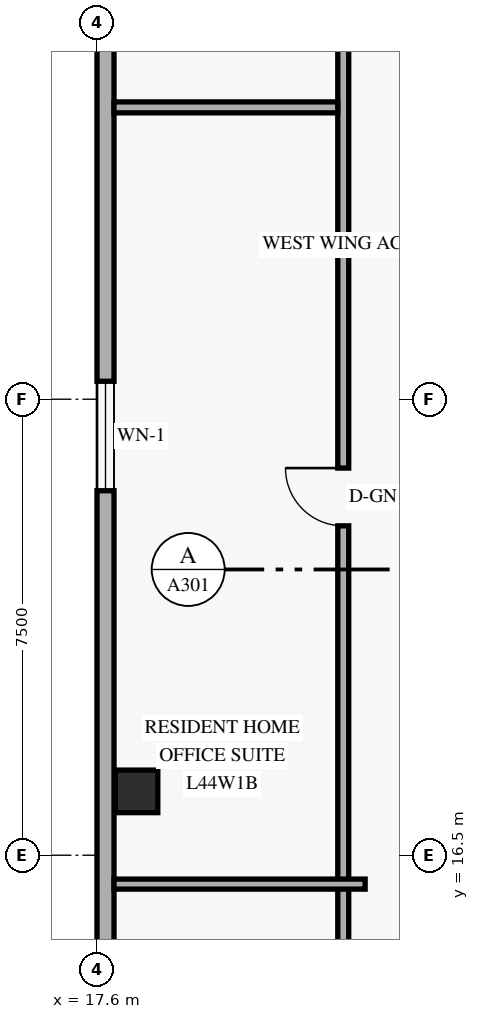
"""IFC4 building model, lengths in metres.
Left out: names, types, materials, properties, quantities, classifications, styles, units other than length and angle.
Written with IfcOpenShell. Run it as: python <this file> out.ifc"""

import sys

from ifc_helpers import new_model, si_unit, direction, frame, frame_2d, origin, origin_2d, place, context, subcontext, project, spatial, rectangle, extrude, element, fill, save


model = new_model("IFC4")
c1 = context("Model", 3, precision=1e-05, world=origin(), true_north=direction((0.0, 1.0)))
c2 = subcontext(c1, "Body", "Model", "MODEL_VIEW")
j1 = project(units=[si_unit("LENGTHUNIT", "METRE"), si_unit("PLANEANGLEUNIT", "RADIAN")], contexts=[c1])
p1 = place(None, origin())
s1 = spatial("IfcSite", under=j1, at=p1, CompositionType="ELEMENT")
p2 = place(p1, origin())
s2 = spatial("IfcBuilding", under=s1, at=p2, CompositionType="ELEMENT")
p3 = place(p2, frame((0.0, 0.0, 169.8)))
s3 = spatial("IfcBuildingStorey", under=s2, at=p3, CompositionType="ELEMENT", Elevation=169.8)
p4 = place(p3, frame((18.25, 17.55, 0.0), z_axis=(0.0, 0.0, 1.0), x_axis=(1.0, 0.0, 0.0)))
e1 = element("IfcColumn", 1, at=p4, inside=s3, PredefinedType="COLUMN", context=c2, shape_type="SweptSolid", body=[
    extrude(rectangle(XDim=0.7, YDim=0.7, at=origin_2d()), origin(), (0.0, 0.0, 1.0), 3.6),
])
p5 = place(p3, frame((17.74, 40.38, 0.0), z_axis=(0.0, 0.0, 1.0), x_axis=(0.0, -1.0, 0.0)))
e2 = element("IfcWall", 2, at=p5, inside=s3, PredefinedType="SOLIDWALL", context=c2, shape_type="SweptSolid", body=[
    extrude(rectangle(XDim=32.76, YDim=0.28, at=frame_2d((16.38, 0.0))), origin(), (0.0, 0.0, 1.0), 3.35),
])
p6 = place(p5, frame((26.623, 0.0, 0.85)))
e3 = element("IfcOpeningElement", 3, at=p6, cuts=e2, PredefinedType="OPENING", context=c2, shape_type="SweptSolid", body=[
    extrude(rectangle(XDim=1.8, YDim=1.6, at=frame_2d((0.9, 0.8))), frame((0.0, 0.15, 0.0), z_axis=(0.0, -1.0, 0.0), x_axis=(1.0, 0.0, 0.0)), (0.0, 0.0, 1.0), 0.3),
])
p7 = place(p5, frame((16.085, 0.0, 0.85)))
e4 = element("IfcOpeningElement", 4, at=p7, cuts=e2, PredefinedType="OPENING", context=c2, shape_type="SweptSolid", body=[
    extrude(rectangle(XDim=1.8, YDim=1.6, at=frame_2d((0.9, 0.8))), frame((0.0, 0.15, 0.0), z_axis=(0.0, -1.0, 0.0), x_axis=(1.0, 0.0, 0.0)), (0.0, 0.0, 1.0), 0.3),
])
p8 = place(p5, frame((5.998, 0.0, 0.85)))
e5 = element("IfcOpeningElement", 5, at=p8, cuts=e2, PredefinedType="OPENING", context=c2, shape_type="SweptSolid", body=[
    extrude(rectangle(XDim=1.8, YDim=1.6, at=frame_2d((0.9, 0.8))), frame((0.0, 0.15, 0.0), z_axis=(0.0, -1.0, 0.0), x_axis=(1.0, 0.0, 0.0)), (0.0, 0.0, 1.0), 0.3),
])
p9 = place(p5, frame((2.462, 0.0, 0.85)))
e6 = element("IfcOpeningElement", 6, at=p9, cuts=e2, PredefinedType="OPENING", context=c2, shape_type="SweptSolid", body=[
    extrude(rectangle(XDim=1.2, YDim=1.5, at=frame_2d((0.6, 0.75))), frame((0.0, 0.15, 0.0), z_axis=(0.0, -1.0, 0.0), x_axis=(1.0, 0.0, 0.0)), (0.0, 0.0, 1.0), 0.3),
])
p10 = place(p3, frame((21.65, 6.8, 0.0), z_axis=(0.0, 0.0, 1.0), x_axis=(0.0, 1.0, 0.0)))
e7 = element("IfcWall", 7, at=p10, inside=s3, PredefinedType="STANDARD", context=c2, shape_type="SweptSolid", body=[
    extrude(rectangle(XDim=34.4, YDim=0.18, at=frame_2d((17.2, 0.0))), origin(), (0.0, 0.0, 1.0), 2.72),
])
p11 = place(p10, frame((2.883, 0.0, 0.0)))
e8 = element("IfcOpeningElement", 8, at=p11, cuts=e7, PredefinedType="OPENING", context=c2, shape_type="SweptSolid", body=[
    extrude(rectangle(XDim=0.95, YDim=2.15, at=frame_2d((0.475, 1.075))), frame((0.0, 0.1, 0.0), z_axis=(0.0, -1.0, 0.0), x_axis=(1.0, 0.0, 0.0)), (0.0, 0.0, 1.0), 0.2),
])
p12 = place(p10, frame((15.117, 0.0, 0.0)))
e9 = element("IfcOpeningElement", 9, at=p12, cuts=e7, PredefinedType="OPENING", context=c2, shape_type="SweptSolid", body=[
    extrude(rectangle(XDim=0.95, YDim=2.15, at=frame_2d((0.475, 1.075))), frame((0.0, 0.1, 0.0), z_axis=(0.0, -1.0, 0.0), x_axis=(1.0, 0.0, 0.0)), (0.0, 0.0, 1.0), 0.2),
])
p13 = place(p10, frame((25.357, 0.0, 0.0)))
e10 = element("IfcOpeningElement", 10, at=p13, cuts=e7, PredefinedType="OPENING", context=c2, shape_type="SweptSolid", body=[
    extrude(rectangle(XDim=0.95, YDim=2.15, at=frame_2d((0.475, 1.075))), frame((0.0, 0.1, 0.0), z_axis=(0.0, -1.0, 0.0), x_axis=(1.0, 0.0, 0.0)), (0.0, 0.0, 1.0), 0.2),
])
p14 = place(p10, frame((32.792, 0.0, 0.0)))
e11 = element("IfcOpeningElement", 11, at=p14, cuts=e7, PredefinedType="OPENING", context=c2, shape_type="SweptSolid", body=[
    extrude(rectangle(XDim=0.95, YDim=2.15, at=frame_2d((0.475, 1.075))), frame((0.0, 0.1, 0.0), z_axis=(0.0, -1.0, 0.0), x_axis=(1.0, 0.0, 0.0)), (0.0, 0.0, 1.0), 0.2),
])
p15 = place(p3, frame((17.88, 16.025, 0.0), z_axis=(0.0, 0.0, 1.0), x_axis=(1.0, 0.0, 0.0)))
e12 = element("IfcWall", 12, at=p15, inside=s3, PredefinedType="PARTITIONING", context=c2, shape_type="SweptSolid", body=[
    extrude(rectangle(XDim=4.13, YDim=0.165, at=frame_2d((2.065, 0.0))), origin(), (0.0, 0.0, 1.0), 2.869),
])
p16 = place(p3, frame((17.88, 28.8, 0.0), z_axis=(0.0, 0.0, 1.0), x_axis=(1.0, 0.0, 0.0)))
e13 = element("IfcWall", 13, at=p16, inside=s3, PredefinedType="PARTITIONING", context=c2, shape_type="SweptSolid", body=[
    extrude(rectangle(XDim=3.68, YDim=0.18, at=frame_2d((1.84, 0.0))), origin(), (0.0, 0.0, 1.0), 2.869),
])
p17 = place(p7, origin())
e14 = element("IfcWindow", 14, at=p17, inside=s3, PartitioningType="SINGLE_PANEL", PredefinedType="WINDOW", context=c2, shape_type="SweptSolid", body=[
    extrude(rectangle(XDim=1.8, YDim=1.6, at=frame_2d((0.9, 0.8))), frame((0.0, 0.03, 0.0), z_axis=(0.0, -1.0, 0.0), x_axis=(1.0, 0.0, 0.0)), (0.0, 0.0, 1.0), 0.06),
])
fill(e4, e14)
p18 = place(p12, origin())
e15 = element("IfcDoor", 15, at=p18, inside=s3, OperationType="SINGLE_SWING_RIGHT", PredefinedType="DOOR", context=c2, shape_type="SweptSolid", body=[
    extrude(rectangle(XDim=0.95, YDim=2.15, at=frame_2d((0.475, 1.075))), frame((0.0, 0.025, 0.0), z_axis=(0.0, -1.0, 0.0), x_axis=(1.0, 0.0, 0.0)), (0.0, 0.0, 1.0), 0.05),
])
fill(e9, e15)
save(model, sys.argv[1])
